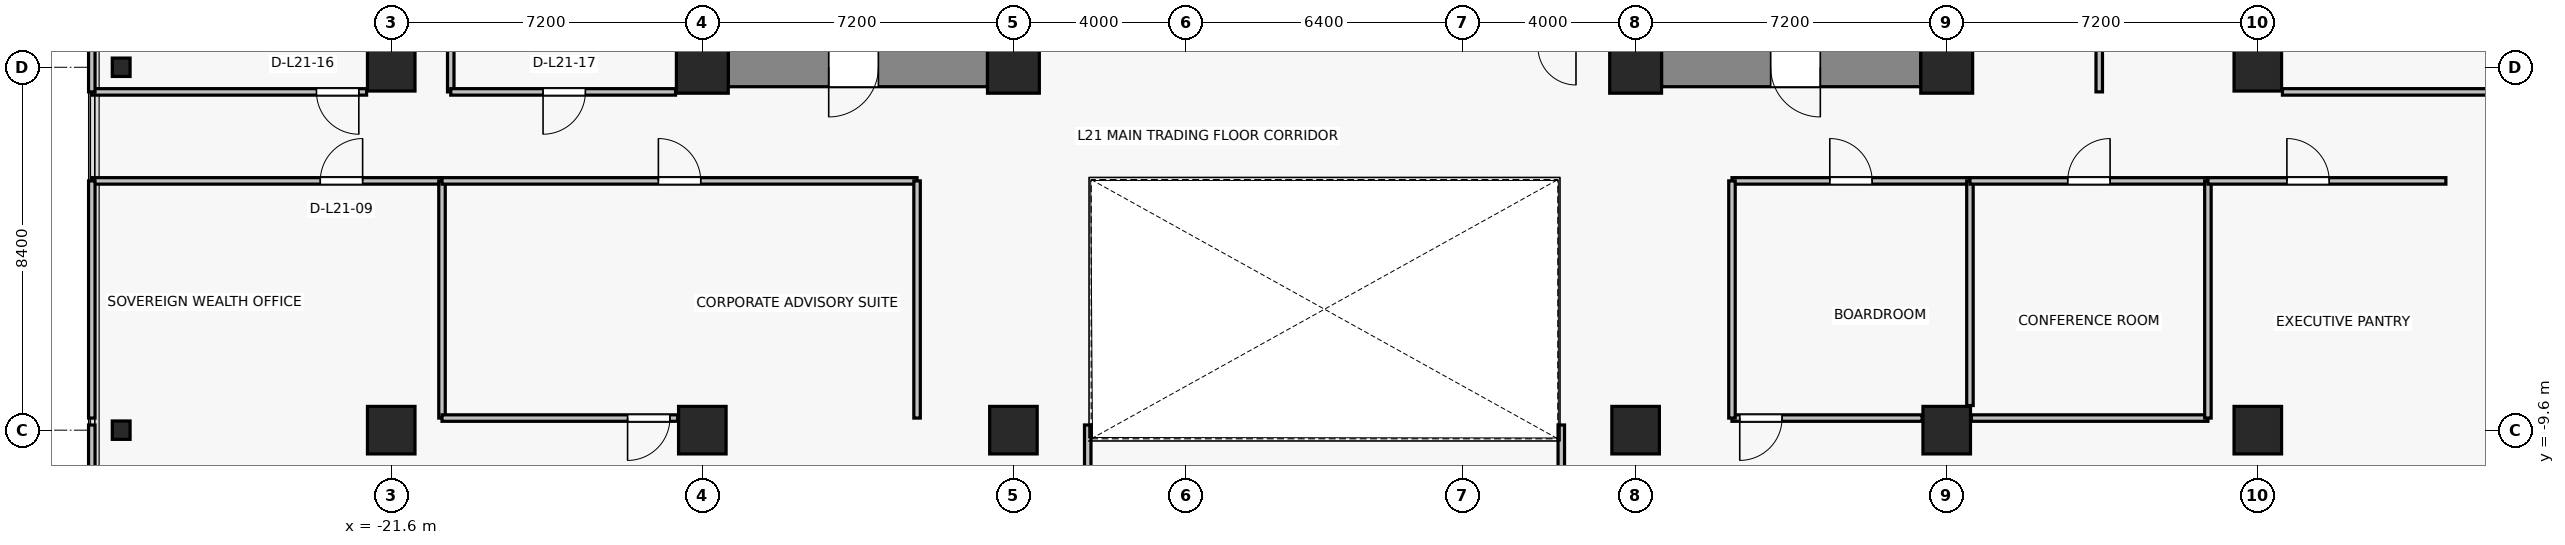
"""IFC4 building model, lengths in metres.
Left out: names, types, materials, properties, quantities, classifications, styles, units other than length and angle.
Written with IfcOpenShell. Run it as: python <this file> out.ifc"""

import sys

from ifc_helpers import new_model, si_unit, direction, frame, frame_2d, origin, origin_2d, place, context, subcontext, project, spatial, rectangle, i_section, extrude, source, transform, mapped, element, fill, save


model = new_model("IFC4")
c1 = context("Model", 3, precision=1e-05, world=origin(), true_north=direction((0.0, 1.0)))
c2 = subcontext(c1, "Body", "Model", "MODEL_VIEW")
j1 = project(units=[si_unit("LENGTHUNIT", "METRE"), si_unit("PLANEANGLEUNIT", "RADIAN")], contexts=[c1])
p1 = place(None, origin())
s1 = spatial("IfcSite", under=j1, at=p1, CompositionType="ELEMENT")
p2 = place(p1, origin())
s2 = spatial("IfcBuilding", under=s1, at=p2, CompositionType="ELEMENT")
p3 = place(p2, frame((0.0, 0.0, 76.9)))
s3 = spatial("IfcBuildingStorey", under=s2, at=p3, CompositionType="ELEMENT", Elevation=76.9)
for number, where, z_axis, x_axis in (
    (1, (-14.4, -1.2, 0.0), (0.0, 0.0, 1.0), (1.0, 0.0, 0.0)),
    (2, (-7.2, -1.2, 0.0), (0.0, 0.0, 1.0), (1.0, 0.0, 0.0)),
    (3, (7.2, -1.2, 0.0), (0.0, 0.0, 1.0), (1.0, 0.0, 0.0)),
    (4, (14.4, -1.2, 0.0), (0.0, 0.0, 1.0), (1.0, 0.0, 0.0)),
):
    element("IfcColumn", number, at=place(p3, frame(where, z_axis=z_axis, x_axis=x_axis)), inside=s3, PredefinedType="COLUMN", context=c2, shape_type="SweptSolid", body=[
        extrude(rectangle(XDim=1.2, YDim=1.2, at=origin_2d()), origin(), (0.0, 0.0, 1.0), 3.3),
    ])
for number, where, z_axis, x_axis in (
    (5, (-14.4, -9.6, 0.0), (0.0, 0.0, 1.0), (1.0, 0.0, 0.0)),
    (6, (-7.2, -9.6, 0.0), (0.0, 0.0, 1.0), (1.0, 0.0, 0.0)),
    (7, (7.2, -9.6, 0.0), (0.0, 0.0, 1.0), (1.0, 0.0, 0.0)),
    (8, (14.4, -9.6, 0.0), (0.0, 0.0, 1.0), (1.0, 0.0, 0.0)),
    (9, (-21.6, -9.6, 0.0), (0.0, 0.0, 1.0), (1.0, 0.0, 0.0)),
    (10, (-21.6, -1.2, 0.0), (0.0, 0.0, 1.0), (1.0, 0.0, 0.0)),
    (11, (21.6, -9.6, 0.0), (0.0, 0.0, 1.0), (1.0, 0.0, 0.0)),
    (12, (21.6, -1.2, 0.0), (0.0, 0.0, 1.0), (1.0, 0.0, 0.0)),
):
    element("IfcColumn", number, at=place(p3, frame(where, z_axis=z_axis, x_axis=x_axis)), inside=s3, PredefinedType="COLUMN", context=c2, shape_type="SweptSolid", body=[
        extrude(rectangle(XDim=1.1, YDim=1.1, at=origin_2d()), origin(), (0.0, 0.0, 1.0), 3.3),
    ])
for number, where, z_axis, x_axis in (
    (13, (-27.85, -9.6, 0.0), (0.0, 0.0, 1.0), (1.0, 0.0, 0.0)),
    (14, (-27.85, -1.2, 0.0), (0.0, 0.0, 1.0), (1.0, 0.0, 0.0)),
):
    element("IfcColumn", number, at=place(p3, frame(where, z_axis=z_axis, x_axis=x_axis)), inside=s3, PredefinedType="COLUMN", context=c2, shape_type="SweptSolid", body=[
        extrude(i_section(OverallWidth=0.412, OverallDepth=0.425, WebThickness=0.026, FlangeThickness=0.039, FilletRadius=0.015, at=origin_2d()), origin(), (0.0, 0.0, 1.0), 3.3),
    ])
p4 = place(p3, frame((-7.8, -1.2, 0.0), z_axis=(0.0, 0.0, 1.0), x_axis=(-1.0, 0.0, 0.0)))
e15 = element("IfcWall", 15, at=p4, inside=s3, PredefinedType="SHEAR", context=c2, shape_type="SweptSolid", body=[
    extrude(rectangle(XDim=6.0, YDim=0.9, at=frame_2d((3.0, 0.0))), origin(), (0.0, 0.0, 1.0), 3.05),
])
p5 = place(p4, frame((2.525, 0.0, 0.0)))
e16 = element("IfcOpeningElement", 16, at=p5, cuts=e15, PredefinedType="OPENING", context=c2, shape_type="SweptSolid", body=[
    extrude(rectangle(XDim=1.15, YDim=2.15, at=frame_2d((0.575, 1.075))), frame((0.0, 0.46, 0.0), z_axis=(0.0, -1.0, 0.0), x_axis=(1.0, 0.0, 0.0)), (0.0, 0.0, 1.0), 0.92),
])
p6 = place(p3, frame((13.8, -1.2, 0.0), z_axis=(0.0, 0.0, 1.0), x_axis=(-1.0, 0.0, 0.0)))
e17 = element("IfcWall", 17, at=p6, inside=s3, PredefinedType="SHEAR", context=c2, shape_type="SweptSolid", body=[
    extrude(rectangle(XDim=6.0, YDim=0.9, at=frame_2d((3.0, 0.0))), origin(), (0.0, 0.0, 1.0), 3.05),
])
p7 = place(p6, frame((2.325, 0.0, 0.0)))
e18 = element("IfcOpeningElement", 18, at=p7, cuts=e17, PredefinedType="OPENING", context=c2, shape_type="SweptSolid", body=[
    extrude(rectangle(XDim=1.15, YDim=2.15, at=frame_2d((0.575, 1.075))), frame((0.0, 0.46, 0.0), z_axis=(0.0, -1.0, 0.0), x_axis=(1.0, 0.0, 0.0)), (0.0, 0.0, 1.0), 0.92),
])
p8 = place(p3, frame((-28.53, -3.83, 0.0), z_axis=(0.0, 0.0, 1.0), x_axis=(1.0, 0.0, 0.0)))
e19 = element("IfcWall", 19, at=p8, inside=s3, PredefinedType="PARTITIONING", context=c2, shape_type="SweptSolid", body=[
    extrude(rectangle(XDim=8.105, YDim=0.15, at=frame_2d((4.053, 0.0))), origin(), (0.0, 0.0, 1.0), 2.44),
])
p9 = place(p8, frame((5.288, 0.0, 0.0)))
e20 = element("IfcOpeningElement", 20, at=p9, cuts=e19, PredefinedType="OPENING", context=c2, shape_type="SweptSolid", body=[
    extrude(rectangle(XDim=0.98, YDim=2.15, at=frame_2d((0.49, 1.075))), frame((0.0, 0.085, 0.0), z_axis=(0.0, -1.0, 0.0), x_axis=(1.0, 0.0, 0.0)), (0.0, 0.0, 1.0), 0.17),
])
p10 = place(p3, frame((-28.53, -9.32, 0.0), z_axis=(0.0, 0.0, 1.0), x_axis=(0.0, 1.0, 0.0)))
e21 = element("IfcWall", 21, at=p10, inside=s3, PredefinedType="PARTITIONING", context=c2, shape_type="SweptSolid", body=[
    extrude(rectangle(XDim=5.49, YDim=0.15, at=frame_2d((2.745, 0.0))), origin(), (0.0, 0.0, 1.0), 3.05),
])
p11 = place(p3, frame((-20.425, -3.83, 0.0), z_axis=(0.0, 0.0, 1.0), x_axis=(0.0, -1.0, 0.0)))
e22 = element("IfcWall", 22, at=p11, inside=s3, PredefinedType="PARTITIONING", context=c2, shape_type="SweptSolid", body=[
    extrude(rectangle(XDim=5.49, YDim=0.15, at=frame_2d((2.745, 0.0))), origin(), (0.0, 0.0, 1.0), 2.44),
])
p12 = place(p3, frame((-14.97, -9.32, 0.0), z_axis=(0.0, 0.0, 1.0), x_axis=(-1.0, 0.0, 0.0)))
e23 = element("IfcWall", 23, at=p12, inside=s3, PredefinedType="PARTITIONING", context=c2, shape_type="SweptSolid", body=[
    extrude(rectangle(XDim=5.455, YDim=0.15, at=frame_2d((2.727, 0.0))), origin(), (0.0, 0.0, 1.0), 2.44),
])
p13 = place(p12, frame((0.18, 0.0, 0.0)))
e24 = element("IfcOpeningElement", 24, at=p13, cuts=e23, PredefinedType="OPENING", context=c2, shape_type="SweptSolid", body=[
    extrude(rectangle(XDim=0.98, YDim=2.15, at=frame_2d((0.49, 1.075))), frame((0.0, 0.085, 0.0), z_axis=(0.0, -1.0, 0.0), x_axis=(1.0, 0.0, 0.0)), (0.0, 0.0, 1.0), 0.17),
])
p14 = place(p3, frame((-20.425, -3.83, 0.0), z_axis=(0.0, 0.0, 1.0), x_axis=(1.0, 0.0, 0.0)))
e25 = element("IfcWall", 25, at=p14, inside=s3, PredefinedType="PARTITIONING", context=c2, shape_type="SweptSolid", body=[
    extrude(rectangle(XDim=10.995, YDim=0.15, at=frame_2d((5.497, 0.0))), origin(), (0.0, 0.0, 1.0), 2.44),
])
p15 = place(p14, frame((5.008, 0.0, 0.0)))
e26 = element("IfcOpeningElement", 26, at=p15, cuts=e25, PredefinedType="OPENING", context=c2, shape_type="SweptSolid", body=[
    extrude(rectangle(XDim=0.98, YDim=2.15, at=frame_2d((0.49, 1.075))), frame((0.0, 0.085, 0.0), z_axis=(0.0, -1.0, 0.0), x_axis=(1.0, 0.0, 0.0)), (0.0, 0.0, 1.0), 0.17),
])
p16 = place(p3, frame((-9.43, -3.83, 0.0), z_axis=(0.0, 0.0, 1.0), x_axis=(0.0, -1.0, 0.0)))
e27 = element("IfcWall", 27, at=p16, inside=s3, PredefinedType="PARTITIONING", context=c2, shape_type="SweptSolid", body=[
    extrude(rectangle(XDim=5.49, YDim=0.15, at=frame_2d((2.745, 0.0))), origin(), (0.0, 0.0, 1.0), 2.44),
])
p17 = place(p3, frame((-28.53, -18.13, 0.0), z_axis=(0.0, 0.0, 1.0), x_axis=(0.0, 1.0, 0.0)))
e28 = element("IfcWall", 28, at=p17, inside=s3, PredefinedType="PARTITIONING", context=c2, shape_type="SweptSolid", body=[
    extrude(rectangle(XDim=8.65, YDim=0.15, at=frame_2d((4.325, 0.0))), origin(), (0.0, 0.0, 1.0), 3.05),
])
p18 = place(p3, frame((-5.48, -9.48, 0.0), z_axis=(0.0, 0.0, 1.0), x_axis=(0.0, -1.0, 0.0)))
e29 = element("IfcWall", 29, at=p18, inside=s3, PredefinedType="PARTITIONING", context=c2, shape_type="SweptSolid", body=[
    extrude(rectangle(XDim=8.65, YDim=0.15, at=frame_2d((4.325, 0.0))), origin(), (0.0, 0.0, 1.0), 2.44),
])
p19 = place(p3, frame((13.83, -9.32, 0.0), z_axis=(0.0, 0.0, 1.0), x_axis=(-1.0, 0.0, 0.0)))
e30 = element("IfcWall", 30, at=p19, inside=s3, PredefinedType="PARTITIONING", context=c2, shape_type="SweptSolid", body=[
    extrude(rectangle(XDim=4.4, YDim=0.15, at=frame_2d((2.2, 0.0))), origin(), (0.0, 0.0, 1.0), 2.44),
])
p20 = place(p19, frame((3.24, 0.0, 0.0)))
e31 = element("IfcOpeningElement", 31, at=p20, cuts=e30, PredefinedType="OPENING", context=c2, shape_type="SweptSolid", body=[
    extrude(rectangle(XDim=0.98, YDim=2.15, at=frame_2d((0.49, 1.075))), frame((0.0, 0.085, 0.0), z_axis=(0.0, -1.0, 0.0), x_axis=(1.0, 0.0, 0.0)), (0.0, 0.0, 1.0), 0.17),
])
p21 = place(p3, frame((9.43, -3.83, 0.0), z_axis=(0.0, 0.0, 1.0), x_axis=(1.0, 0.0, 0.0)))
e32 = element("IfcWall", 32, at=p21, inside=s3, PredefinedType="PARTITIONING", context=c2, shape_type="SweptSolid", body=[
    extrude(rectangle(XDim=5.508, YDim=0.15, at=frame_2d((2.754, 0.0))), origin(), (0.0, 0.0, 1.0), 2.44),
])
p22 = place(p21, frame((2.264, 0.0, 0.0)))
e33 = element("IfcOpeningElement", 33, at=p22, cuts=e32, PredefinedType="OPENING", context=c2, shape_type="SweptSolid", body=[
    extrude(rectangle(XDim=0.98, YDim=2.15, at=frame_2d((0.49, 1.075))), frame((0.0, 0.085, 0.0), z_axis=(0.0, -1.0, 0.0), x_axis=(1.0, 0.0, 0.0)), (0.0, 0.0, 1.0), 0.17),
])
p23 = place(p3, frame((9.43, -9.32, 0.0), z_axis=(0.0, 0.0, 1.0), x_axis=(0.0, 1.0, 0.0)))
e34 = element("IfcWall", 34, at=p23, inside=s3, PredefinedType="PARTITIONING", context=c2, shape_type="SweptSolid", body=[
    extrude(rectangle(XDim=5.49, YDim=0.15, at=frame_2d((2.745, 0.0))), origin(), (0.0, 0.0, 1.0), 2.44),
])
p24 = place(p3, frame((14.938, -3.83, 0.0), z_axis=(0.0, 0.0, 1.0), x_axis=(0.0, -1.0, 0.0)))
e35 = element("IfcWall", 35, at=p24, inside=s3, PredefinedType="PARTITIONING", context=c2, shape_type="SweptSolid", body=[
    extrude(rectangle(XDim=5.2, YDim=0.15, at=frame_2d((2.6, 0.0))), origin(), (0.0, 0.0, 1.0), 2.54),
])
p25 = place(p3, frame((20.445, -9.32, 0.0), z_axis=(0.0, 0.0, 1.0), x_axis=(-1.0, 0.0, 0.0)))
e36 = element("IfcWall", 36, at=p25, inside=s3, PredefinedType="PARTITIONING", context=c2, shape_type="SweptSolid", body=[
    extrude(rectangle(XDim=5.475, YDim=0.15, at=frame_2d((2.738, 0.0))), origin(), (0.0, 0.0, 1.0), 2.44),
])
p26 = place(p3, frame((14.938, -3.83, 0.0), z_axis=(0.0, 0.0, 1.0), x_axis=(1.0, 0.0, 0.0)))
e37 = element("IfcWall", 37, at=p26, inside=s3, PredefinedType="PARTITIONING", context=c2, shape_type="SweptSolid", body=[
    extrude(rectangle(XDim=5.508, YDim=0.15, at=frame_2d((2.754, 0.0))), origin(), (0.0, 0.0, 1.0), 3.05),
])
p27 = place(p26, frame((2.263, 0.0, 0.0)))
e38 = element("IfcOpeningElement", 38, at=p27, cuts=e37, PredefinedType="OPENING", context=c2, shape_type="SweptSolid", body=[
    extrude(rectangle(XDim=0.98, YDim=2.15, at=frame_2d((0.49, 1.075))), frame((0.0, 0.085, 0.0), z_axis=(0.0, -1.0, 0.0), x_axis=(1.0, 0.0, 0.0)), (0.0, 0.0, 1.0), 0.17),
])
p28 = place(p3, frame((20.445, -3.83, 0.0), z_axis=(0.0, 0.0, 1.0), x_axis=(0.0, -1.0, 0.0)))
e39 = element("IfcWall", 39, at=p28, inside=s3, PredefinedType="PARTITIONING", context=c2, shape_type="SweptSolid", body=[
    extrude(rectangle(XDim=5.49, YDim=0.15, at=frame_2d((2.745, 0.0))), origin(), (0.0, 0.0, 1.0), 2.44),
])
p29 = place(p3, frame((20.445, -3.83, 0.0), z_axis=(0.0, 0.0, 1.0), x_axis=(1.0, 0.0, 0.0)))
e40 = element("IfcWall", 40, at=p29, inside=s3, PredefinedType="PARTITIONING", context=c2, shape_type="SweptSolid", body=[
    extrude(rectangle(XDim=5.508, YDim=0.15, at=frame_2d((2.754, 0.0))), origin(), (0.0, 0.0, 1.0), 2.44),
])
p30 = place(p29, frame((1.828, 0.0, 0.0)))
e41 = element("IfcOpeningElement", 41, at=p30, cuts=e40, PredefinedType="OPENING", context=c2, shape_type="SweptSolid", body=[
    extrude(rectangle(XDim=0.98, YDim=2.15, at=frame_2d((0.49, 1.075))), frame((0.0, 0.085, 0.0), z_axis=(0.0, -1.0, 0.0), x_axis=(1.0, 0.0, 0.0)), (0.0, 0.0, 1.0), 0.17),
])
p31 = place(p3, frame((5.48, -18.13, 0.0), z_axis=(0.0, 0.0, 1.0), x_axis=(0.0, 1.0, 0.0)))
e42 = element("IfcWall", 42, at=p31, inside=s3, PredefinedType="PARTITIONING", context=c2, shape_type="SweptSolid", body=[
    extrude(rectangle(XDim=8.65, YDim=0.15, at=frame_2d((4.325, 0.0))), origin(), (0.0, 0.0, 1.0), 2.44),
])
p32 = place(p3, frame((-22.17, -1.77, 0.0), z_axis=(0.0, 0.0, 1.0), x_axis=(-1.0, 0.0, 0.0)))
e43 = element("IfcWall", 43, at=p32, inside=s3, PredefinedType="PARTITIONING", context=c2, shape_type="SweptSolid", body=[
    extrude(rectangle(XDim=6.36, YDim=0.15, at=frame_2d((3.18, 0.0))), origin(), (0.0, 0.0, 1.0), 2.44),
])
p33 = place(p32, frame((0.18, 0.0, 0.0)))
e44 = element("IfcOpeningElement", 44, at=p33, cuts=e43, PredefinedType="OPENING", context=c2, shape_type="SweptSolid", body=[
    extrude(rectangle(XDim=0.98, YDim=2.15, at=frame_2d((0.49, 1.075))), frame((0.0, 0.085, 0.0), z_axis=(0.0, -1.0, 0.0), x_axis=(1.0, 0.0, 0.0)), (0.0, 0.0, 1.0), 0.17),
])
p34 = place(p3, frame((-28.53, -1.77, 0.0), z_axis=(0.0, 0.0, 1.0), x_axis=(0.0, 1.0, 0.0)))
e45 = element("IfcWall", 45, at=p34, inside=s3, PredefinedType="PARTITIONING", context=c2, shape_type="SweptSolid", body=[
    extrude(rectangle(XDim=15.65, YDim=0.15, at=frame_2d((7.825, 0.0))), origin(), (0.0, 0.0, 1.0), 3.05),
])
p35 = place(p3, frame((-20.222, 13.88, 0.0), z_axis=(0.0, 0.0, 1.0), x_axis=(0.0, -1.0, 0.0)))
e46 = element("IfcWall", 46, at=p35, inside=s3, PredefinedType="PARTITIONING", context=c2, shape_type="SweptSolid", body=[
    extrude(rectangle(XDim=15.65, YDim=0.15, at=frame_2d((7.825, 0.0))), origin(), (0.0, 0.0, 1.0), 2.44),
])
p36 = place(p3, frame((-15.02, -1.77, 0.0), z_axis=(0.0, 0.0, 1.0), x_axis=(-1.0, 0.0, 0.0)))
e47 = element("IfcWall", 47, at=p36, inside=s3, PredefinedType="PARTITIONING", context=c2, shape_type="SweptSolid", body=[
    extrude(rectangle(XDim=5.202, YDim=0.15, at=frame_2d((2.601, 0.0))), origin(), (0.0, 0.0, 1.0), 3.05),
])
p37 = place(p36, frame((2.086, 0.0, 0.0)))
e48 = element("IfcOpeningElement", 48, at=p37, cuts=e47, PredefinedType="OPENING", context=c2, shape_type="SweptSolid", body=[
    extrude(rectangle(XDim=0.98, YDim=2.15, at=frame_2d((0.49, 1.075))), frame((0.0, 0.085, 0.0), z_axis=(0.0, -1.0, 0.0), x_axis=(1.0, 0.0, 0.0)), (0.0, 0.0, 1.0), 0.17),
])
p38 = place(p3, frame((32.53, -1.77, 0.0), z_axis=(0.0, 0.0, 1.0), x_axis=(-1.0, 0.0, 0.0)))
e49 = element("IfcWall", 49, at=p38, inside=s3, PredefinedType="PARTITIONING", context=c2, shape_type="SweptSolid", body=[
    extrude(rectangle(XDim=10.36, YDim=0.15, at=frame_2d((5.18, 0.0))), origin(), (0.0, 0.0, 1.0), 2.44),
])
p39 = place(p3, frame((17.93, -1.77, 0.0), z_axis=(0.0, 0.0, 1.0), x_axis=(0.0, 1.0, 0.0)))
e50 = element("IfcWall", 50, at=p39, inside=s3, PredefinedType="PARTITIONING", context=c2, shape_type="SweptSolid", body=[
    extrude(rectangle(XDim=3.821, YDim=0.15, at=frame_2d((1.911, 0.0))), origin(), (0.0, 0.0, 1.0), 2.44),
])
p40 = place(p39, frame((1.421, 0.0, 0.0)))
e51 = element("IfcOpeningElement", 51, at=p40, cuts=e50, PredefinedType="OPENING", context=c2, shape_type="SweptSolid", body=[
    extrude(rectangle(XDim=0.98, YDim=2.15, at=frame_2d((0.49, 1.075))), frame((0.0, 0.085, 0.0), z_axis=(0.0, -1.0, 0.0), x_axis=(1.0, 0.0, 0.0)), (0.0, 0.0, 1.0), 0.17),
])
m1 = source(origin(), c2, "Body", "SweptSolid", [
    extrude(rectangle(XDim=1.15, YDim=2.15, at=frame_2d((0.575, 1.075))), frame((0.0, 0.025, 0.0), z_axis=(0.0, -1.0, 0.0), x_axis=(1.0, 0.0, 0.0)), (0.0, 0.0, 1.0), 0.05),
])
p41 = place(p5, origin())
e52 = element("IfcDoor", 52, at=p41, inside=s3, OperationType="SINGLE_SWING_RIGHT", PredefinedType="DOOR", context=c2, shape_type="MappedRepresentation", body=[
    mapped(m1, transform((0.0, 0.0, 0.0), x_axis=(1.0, 0.0, 0.0), y_axis=(0.0, 1.0, 0.0), z_axis=(0.0, 0.0, 1.0), scale=1.0)),
])
fill(e16, e52)
p42 = place(p7, origin())
e53 = element("IfcDoor", 53, at=p42, inside=s3, OperationType="SINGLE_SWING_LEFT", PredefinedType="DOOR", context=c2, shape_type="MappedRepresentation", body=[
    mapped(m1, transform((0.0, 0.0, 0.0), x_axis=(1.0, 0.0, 0.0), y_axis=(0.0, 1.0, 0.0), z_axis=(0.0, 0.0, 1.0), scale=1.0)),
])
fill(e18, e53)
m2 = source(origin(), c2, "Body", "SweptSolid", [
    extrude(rectangle(XDim=0.98, YDim=2.15, at=frame_2d((0.49, 1.075))), frame((0.0, 0.025, 0.0), z_axis=(0.0, -1.0, 0.0), x_axis=(1.0, 0.0, 0.0)), (0.0, 0.0, 1.0), 0.05),
])
p43 = place(p9, origin())
e54 = element("IfcDoor", 54, at=p43, inside=s3, OperationType="SINGLE_SWING_RIGHT", PredefinedType="DOOR", context=c2, shape_type="MappedRepresentation", body=[
    mapped(m2, transform((0.0, 0.0, 0.0), x_axis=(1.0, 0.0, 0.0), y_axis=(0.0, 1.0, 0.0), z_axis=(0.0, 0.0, 1.0), scale=1.0)),
])
fill(e20, e54)
p44 = place(p15, origin())
e55 = element("IfcDoor", 55, at=p44, inside=s3, OperationType="SINGLE_SWING_LEFT", PredefinedType="DOOR", context=c2, shape_type="MappedRepresentation", body=[
    mapped(m2, transform((0.0, 0.0, 0.0), x_axis=(1.0, 0.0, 0.0), y_axis=(0.0, 1.0, 0.0), z_axis=(0.0, 0.0, 1.0), scale=1.0)),
])
fill(e26, e55)
p45 = place(p13, origin())
e56 = element("IfcDoor", 56, at=p45, inside=s3, OperationType="SINGLE_SWING_RIGHT", PredefinedType="DOOR", context=c2, shape_type="MappedRepresentation", body=[
    mapped(m2, transform((0.0, 0.0, 0.0), x_axis=(1.0, 0.0, 0.0), y_axis=(0.0, 1.0, 0.0), z_axis=(0.0, 0.0, 1.0), scale=1.0)),
])
fill(e24, e56)
p46 = place(p22, origin())
e57 = element("IfcDoor", 57, at=p46, inside=s3, OperationType="SINGLE_SWING_LEFT", PredefinedType="DOOR", context=c2, shape_type="MappedRepresentation", body=[
    mapped(m2, transform((0.0, 0.0, 0.0), x_axis=(1.0, 0.0, 0.0), y_axis=(0.0, 1.0, 0.0), z_axis=(0.0, 0.0, 1.0), scale=1.0)),
])
fill(e33, e57)
p47 = place(p27, origin())
e58 = element("IfcDoor", 58, at=p47, inside=s3, OperationType="SINGLE_SWING_RIGHT", PredefinedType="DOOR", context=c2, shape_type="MappedRepresentation", body=[
    mapped(m2, transform((0.0, 0.0, 0.0), x_axis=(1.0, 0.0, 0.0), y_axis=(0.0, 1.0, 0.0), z_axis=(0.0, 0.0, 1.0), scale=1.0)),
])
fill(e38, e58)
p48 = place(p30, origin())
e59 = element("IfcDoor", 59, at=p48, inside=s3, OperationType="SINGLE_SWING_LEFT", PredefinedType="DOOR", context=c2, shape_type="MappedRepresentation", body=[
    mapped(m2, transform((0.0, 0.0, 0.0), x_axis=(1.0, 0.0, 0.0), y_axis=(0.0, 1.0, 0.0), z_axis=(0.0, 0.0, 1.0), scale=1.0)),
])
fill(e41, e59)
p49 = place(p20, origin())
e60 = element("IfcDoor", 60, at=p49, inside=s3, OperationType="SINGLE_SWING_RIGHT", PredefinedType="DOOR", context=c2, shape_type="MappedRepresentation", body=[
    mapped(m2, transform((0.0, 0.0, 0.0), x_axis=(1.0, 0.0, 0.0), y_axis=(0.0, 1.0, 0.0), z_axis=(0.0, 0.0, 1.0), scale=1.0)),
])
fill(e31, e60)
p50 = place(p33, origin())
e61 = element("IfcDoor", 61, at=p50, inside=s3, OperationType="SINGLE_SWING_LEFT", PredefinedType="DOOR", context=c2, shape_type="MappedRepresentation", body=[
    mapped(m2, transform((0.0, 0.0, 0.0), x_axis=(1.0, 0.0, 0.0), y_axis=(0.0, 1.0, 0.0), z_axis=(0.0, 0.0, 1.0), scale=1.0)),
])
fill(e44, e61)
p51 = place(p37, origin())
e62 = element("IfcDoor", 62, at=p51, inside=s3, OperationType="SINGLE_SWING_RIGHT", PredefinedType="DOOR", context=c2, shape_type="MappedRepresentation", body=[
    mapped(m2, transform((0.0, 0.0, 0.0), x_axis=(1.0, 0.0, 0.0), y_axis=(0.0, 1.0, 0.0), z_axis=(0.0, 0.0, 1.0), scale=1.0)),
])
fill(e48, e62)
save(model, sys.argv[1])
